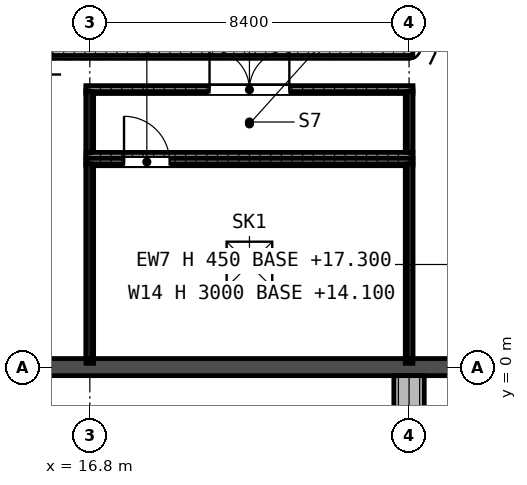
"""IFC4 building model, lengths in metres.
Left out: names, types, materials, properties, quantities, classifications, styles, units other than length and angle.
Written with IfcOpenShell. Run it as: python <this file> out.ifc"""

import sys

from ifc_helpers import new_model, si_unit, direction, frame, frame_2d, origin, origin_2d, place, context, subcontext, project, spatial, rectangle, extrude, element, fill, save


model = new_model("IFC4")
c1 = context("Model", 3, precision=1e-05, world=origin(), true_north=direction((0.0, 1.0)))
c2 = subcontext(c1, "Body", "Model", "MODEL_VIEW")
j1 = project(units=[si_unit("LENGTHUNIT", "METRE"), si_unit("PLANEANGLEUNIT", "RADIAN")], contexts=[c1])
p1 = place(None, origin())
s1 = spatial("IfcSite", under=j1, at=p1, CompositionType="ELEMENT")
p2 = place(p1, origin())
s2 = spatial("IfcBuilding", under=s1, at=p2, CompositionType="ELEMENT")
p3 = place(p2, frame((0.0, 0.0, 14.4)))
s3 = spatial("IfcBuildingStorey", under=s2, at=p3, CompositionType="ELEMENT", Elevation=14.4)
p4 = place(p3, frame((0.0, 0.0, -0.3), z_axis=(0.0, 0.0, 1.0), x_axis=(1.0, 0.0, 0.0)))
e1 = element("IfcWall", 1, at=p4, inside=s3, PredefinedType="SOLIDWALL", context=c2, shape_type="SweptSolid", body=[
    extrude(rectangle(XDim=168.0, YDim=0.45, at=frame_2d((84.0, 0.0))), origin(), (0.0, 0.0, 1.0), 3.3),
])
p5 = place(p3, frame((16.7, 5.4, -0.3), z_axis=(0.0, 0.0, 1.0), x_axis=(1.0, 0.0, 0.0)))
e2 = element("IfcWall", 2, at=p5, inside=s3, PredefinedType="SHEAR", context=c2, shape_type="SweptSolid", body=[
    extrude(rectangle(XDim=8.6, YDim=0.2, at=frame_2d((4.3, 0.0))), origin(), (0.0, 0.0, 1.0), 3.0),
])
p6 = place(p5, frame((1.0, 0.0, 0.3)))
e3 = element("IfcOpeningElement", 3, at=p6, cuts=e2, PredefinedType="OPENING", context=c2, shape_type="SweptSolid", body=[
    extrude(rectangle(XDim=1.2, YDim=2.2, at=frame_2d((0.6, 1.1))), frame((0.0, 0.11, 0.0), z_axis=(0.0, -1.0, 0.0), x_axis=(1.0, 0.0, 0.0)), (0.0, 0.0, 1.0), 0.22),
])
for number, where, z_axis, x_axis in (
    (4, (16.8, 0.1, -0.3), (0.0, 0.0, 1.0), (0.0, 1.0, 0.0)),
    (5, (25.2, 0.1, -0.3), (0.0, 0.0, 1.0), (0.0, 1.0, 0.0)),
):
    element("IfcWall", number, at=place(p3, frame(where, z_axis=z_axis, x_axis=x_axis)), inside=s3, PredefinedType="SHEAR", context=c2, shape_type="SweptSolid", body=[
        extrude(rectangle(XDim=5.2, YDim=0.2, at=frame_2d((2.6, 0.0))), origin(), (0.0, 0.0, 1.0), 3.0),
    ])
for number, where, z_axis, x_axis in (
    (6, (16.8, 5.4, -0.3), (0.0, 0.0, 1.0), (0.0, 1.0, 0.0)),
    (7, (25.2, 5.4, -0.3), (0.0, 0.0, 1.0), (0.0, 1.0, 0.0)),
):
    element("IfcWall", number, at=place(p3, frame(where, z_axis=z_axis, x_axis=x_axis)), inside=s3, PredefinedType="SHEAR", context=c2, shape_type="SweptSolid", body=[
        extrude(rectangle(XDim=1.9, YDim=0.2, at=frame_2d((0.95, 0.0))), origin(), (0.0, 0.0, 1.0), 3.0),
    ])
p7 = place(p3, frame((16.7, 7.3, -0.3), z_axis=(0.0, 0.0, 1.0), x_axis=(1.0, 0.0, 0.0)))
e8 = element("IfcWall", 8, at=p7, inside=s3, PredefinedType="SHEAR", context=c2, shape_type="SweptSolid", body=[
    extrude(rectangle(XDim=8.6, YDim=0.2, at=frame_2d((4.3, 0.0))), origin(), (0.0, 0.0, 1.0), 3.0),
])
p8 = place(p7, frame((3.25, 0.0, 0.3)))
e9 = element("IfcOpeningElement", 9, at=p8, cuts=e8, PredefinedType="OPENING", context=c2, shape_type="SweptSolid", body=[
    extrude(rectangle(XDim=2.1, YDim=2.2, at=frame_2d((1.05, 1.1))), frame((0.0, 0.11, 0.0), z_axis=(0.0, -1.0, 0.0), x_axis=(1.0, 0.0, 0.0)), (0.0, 0.0, 1.0), 0.22),
])
p9 = place(p3, frame((0.2, 8.3, 0.0), z_axis=(0.0, 0.0, 1.0), x_axis=(1.0, 0.0, 0.0)))
e10 = element("IfcWall", 10, at=p9, inside=s3, PredefinedType="PARAPET", context=c2, shape_type="SweptSolid", body=[
    extrude(rectangle(XDim=25.1, YDim=0.2, at=frame_2d((12.55, 0.0))), origin(), (0.0, 0.0, 1.0), 1.5),
])
p10 = place(p3, frame((16.7, 5.425, 2.9), z_axis=(0.0, 0.0, 1.0), x_axis=(1.0, 0.0, 0.0)))
e11 = element("IfcWall", 11, at=p10, inside=s3, PredefinedType="PARAPET", context=c2, shape_type="SweptSolid", body=[
    extrude(rectangle(XDim=8.6, YDim=0.15, at=frame_2d((4.3, 0.0))), origin(), (0.0, 0.0, 1.0), 0.45),
])
for number, where, z_axis, x_axis in (
    (12, (16.775, 0.225, 2.9), (0.0, 0.0, 1.0), (0.0, 1.0, 0.0)),
    (13, (25.225, 0.225, 2.9), (0.0, 0.0, 1.0), (0.0, 1.0, 0.0)),
):
    element("IfcWall", number, at=place(p3, frame(where, z_axis=z_axis, x_axis=x_axis)), inside=s3, PredefinedType="PARAPET", context=c2, shape_type="SweptSolid", body=[
        extrude(rectangle(XDim=5.125, YDim=0.15, at=frame_2d((2.562, 0.0))), origin(), (0.0, 0.0, 1.0), 0.45),
    ])
for number, where, z_axis, x_axis in (
    (14, (16.7, 5.575, 2.9), (0.0, 0.0, 1.0), (1.0, 0.0, 0.0)),
    (15, (16.7, 7.325, 2.9), (0.0, 0.0, 1.0), (1.0, 0.0, 0.0)),
):
    element("IfcWall", number, at=place(p3, frame(where, z_axis=z_axis, x_axis=x_axis)), inside=s3, PredefinedType="PARAPET", context=c2, shape_type="SweptSolid", body=[
        extrude(rectangle(XDim=8.6, YDim=0.15, at=frame_2d((4.3, 0.0))), origin(), (0.0, 0.0, 1.0), 0.45),
    ])
for number, where, z_axis, x_axis in (
    (16, (16.775, 5.65, 2.9), (0.0, 0.0, 1.0), (0.0, 1.0, 0.0)),
    (17, (25.225, 5.65, 2.9), (0.0, 0.0, 1.0), (0.0, 1.0, 0.0)),
):
    element("IfcWall", number, at=place(p3, frame(where, z_axis=z_axis, x_axis=x_axis)), inside=s3, PredefinedType="PARAPET", context=c2, shape_type="SweptSolid", body=[
        extrude(rectangle(XDim=1.6, YDim=0.15, at=frame_2d((0.8, 0.0))), origin(), (0.0, 0.0, 1.0), 0.45),
    ])
p11 = place(p3, frame((25.2, -0.225, -0.3), z_axis=(0.0, 0.0, 1.0), x_axis=(0.0, -1.0, 0.0)))
e18 = element("IfcWall", 18, at=p11, inside=s3, PredefinedType="SOLIDWALL", context=c2, shape_type="SweptSolid", body=[
    extrude(rectangle(XDim=0.9, YDim=0.8, at=frame_2d((0.45, 0.0))), origin(), (0.0, 0.0, 1.0), 3.3),
])
p12 = place(p8, origin())
e19 = element("IfcDoor", 19, at=p12, inside=s3, OperationType="DOUBLE_DOOR_SINGLE_SWING", PredefinedType="DOOR", context=c2, shape_type="SweptSolid", body=[
    extrude(rectangle(XDim=2.1, YDim=0.013, at=frame_2d((1.05, 0.007))), frame((0.0, 0.088, 0.0), z_axis=(0.0, -1.0, 0.0), x_axis=(1.0, 0.0, 0.0)), (0.0, 0.0, 1.0), 0.176),
    extrude(rectangle(XDim=0.075, YDim=2.112, at=frame_2d((0.038, 1.069))), frame((0.0, 0.098, 0.0), z_axis=(0.0, -1.0, 0.0), x_axis=(1.0, 0.0, 0.0)), (0.0, 0.0, 1.0), 0.196),
    extrude(rectangle(XDim=0.075, YDim=2.112, at=frame_2d((2.062, 1.069))), frame((0.0, 0.098, 0.0), z_axis=(0.0, -1.0, 0.0), x_axis=(1.0, 0.0, 0.0)), (0.0, 0.0, 1.0), 0.196),
    extrude(rectangle(XDim=2.1, YDim=0.075, at=frame_2d((1.05, 2.163))), frame((0.0, 0.088, 0.0), z_axis=(0.0, -1.0, 0.0), x_axis=(1.0, 0.0, 0.0)), (0.0, 0.0, 1.0), 0.176),
    extrude(rectangle(XDim=1.95, YDim=2.112, at=frame_2d((1.05, 1.069))), frame((0.0, 0.025, 0.0), z_axis=(0.0, -1.0, 0.0), x_axis=(1.0, 0.0, 0.0)), (0.0, 0.0, 1.0), 0.05),
])
fill(e9, e19)
p13 = place(p6, origin())
e20 = element("IfcDoor", 20, at=p13, inside=s3, OperationType="SINGLE_SWING_RIGHT", PredefinedType="DOOR", context=c2, shape_type="SweptSolid", body=[
    extrude(rectangle(XDim=1.2, YDim=2.2, at=frame_2d((0.6, 1.1))), frame((0.0, 0.025, 0.0), z_axis=(0.0, -1.0, 0.0), x_axis=(1.0, 0.0, 0.0)), (0.0, 0.0, 1.0), 0.05),
])
fill(e3, e20)
p14 = place(p3, frame((0.0, 0.0, 2.7)))
p15 = place(p14, frame((21.0, 2.7, 0.0)))
p16 = place(p15, frame((0.0, 0.0, 0.15)))
e21 = element("IfcWindow", 21, at=p16, inside=s3, PartitioningType="SINGLE_PANEL", PredefinedType="SKYLIGHT", context=c2, shape_type="SweptSolid", body=[
    extrude(rectangle(XDim=1.2, YDim=1.2, at=origin_2d()), origin(), (0.0, 0.0, 1.0), 0.05),
])
save(model, sys.argv[1])
